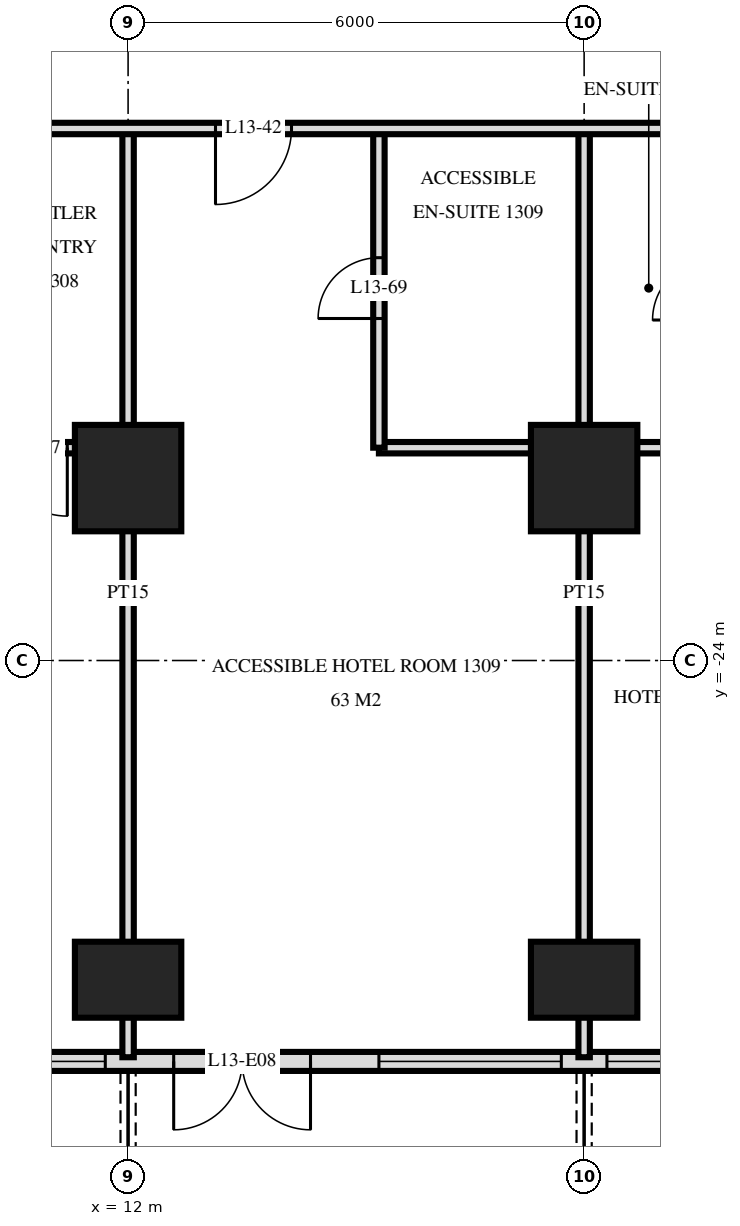
"""IFC4 building model, lengths in metres.
Left out: names, types, materials, properties, quantities, classifications, styles, units other than length and angle.
Written with IfcOpenShell. Run it as: python <this file> out.ifc"""

import sys

from ifc_helpers import new_model, si_unit, direction, frame, frame_2d, origin, origin_2d, place, context, subcontext, project, spatial, rectangle, extrude, element, fill, save


model = new_model("IFC4")
c1 = context("Model", 3, precision=1e-05, world=origin(), true_north=direction((0.0, 1.0)))
c2 = subcontext(c1, "Body", "Model", "MODEL_VIEW")
j1 = project(units=[si_unit("LENGTHUNIT", "METRE"), si_unit("PLANEANGLEUNIT", "RADIAN")], contexts=[c1])
p1 = place(None, origin())
s1 = spatial("IfcSite", under=j1, at=p1, CompositionType="ELEMENT")
p2 = place(p1, origin())
s2 = spatial("IfcBuilding", under=s1, at=p2, CompositionType="ELEMENT")
p3 = place(p2, frame((0.0, 0.0, 56.4)))
s3 = spatial("IfcBuildingStorey", under=s2, at=p3, CompositionType="ELEMENT", Elevation=56.4)
p4 = place(p3, frame((12.0, -28.2, 0.0), z_axis=(0.0, 0.0, 1.0), x_axis=(1.0, 0.0, 0.0)))
e1 = element("IfcColumn", 1, at=p4, inside=s3, PredefinedType="COLUMN", context=c2, shape_type="SweptSolid", body=[
    extrude(rectangle(XDim=1.4, YDim=1.0, at=origin_2d()), origin(), (0.0, 0.0, 1.0), 3.6),
])
p5 = place(p3, frame((12.0, -21.6, 0.0), z_axis=(0.0, 0.0, 1.0), x_axis=(1.0, 0.0, 0.0)))
e2 = element("IfcColumn", 2, at=p5, inside=s3, PredefinedType="COLUMN", context=c2, shape_type="SweptSolid", body=[
    extrude(rectangle(XDim=1.4, YDim=1.4, at=origin_2d()), origin(), (0.0, 0.0, 1.0), 3.6),
])
p6 = place(p3, frame((18.0, -28.2, 0.0), z_axis=(0.0, 0.0, 1.0), x_axis=(1.0, 0.0, 0.0)))
e3 = element("IfcColumn", 3, at=p6, inside=s3, PredefinedType="COLUMN", context=c2, shape_type="SweptSolid", body=[
    extrude(rectangle(XDim=1.4, YDim=1.0, at=origin_2d()), origin(), (0.0, 0.0, 1.0), 3.6),
])
p7 = place(p3, frame((18.0, -21.6, 0.0), z_axis=(0.0, 0.0, 1.0), x_axis=(1.0, 0.0, 0.0)))
e4 = element("IfcColumn", 4, at=p7, inside=s3, PredefinedType="COLUMN", context=c2, shape_type="SweptSolid", body=[
    extrude(rectangle(XDim=1.4, YDim=1.4, at=origin_2d()), origin(), (0.0, 0.0, 1.0), 3.6),
])
p8 = place(p3, frame((-28.775, -29.275, 0.0), z_axis=(0.0, 0.0, 1.0), x_axis=(1.0, 0.0, 0.0)))
e5 = element("IfcWall", 5, at=p8, inside=s3, PredefinedType="SOLIDWALL", context=c2, shape_type="SweptSolid", body=[
    extrude(rectangle(XDim=57.551, YDim=0.25, at=frame_2d((28.775, 0.0))), origin(), (0.0, 0.0, 1.0), 3.32),
])
p9 = place(p8, frame((0.575, 0.0, 0.0)))
e6 = element("IfcOpeningElement", 6, at=p9, cuts=e5, PredefinedType="OPENING", context=c2, shape_type="SweptSolid", body=[
    extrude(rectangle(XDim=1.8, YDim=2.4, at=frame_2d((0.9, 1.2))), frame((0.0, 0.135, 0.0), z_axis=(0.0, -1.0, 0.0), x_axis=(1.0, 0.0, 0.0)), (0.0, 0.0, 1.0), 0.27),
])
p10 = place(p8, frame((5.375, 0.0, 0.0)))
e7 = element("IfcOpeningElement", 7, at=p10, cuts=e5, PredefinedType="OPENING", context=c2, shape_type="SweptSolid", body=[
    extrude(rectangle(XDim=1.8, YDim=2.4, at=frame_2d((0.9, 1.2))), frame((0.0, 0.135, 0.0), z_axis=(0.0, -1.0, 0.0), x_axis=(1.0, 0.0, 0.0)), (0.0, 0.0, 1.0), 0.27),
])
p11 = place(p8, frame((8.075, 0.0, 0.3)))
e8 = element("IfcOpeningElement", 8, at=p11, cuts=e5, PredefinedType="OPENING", context=c2, shape_type="SweptSolid", body=[
    extrude(rectangle(XDim=2.4, YDim=2.1, at=frame_2d((1.2, 1.05))), frame((0.0, 0.135, 0.0), z_axis=(0.0, -1.0, 0.0), x_axis=(1.0, 0.0, 0.0)), (0.0, 0.0, 1.0), 0.27),
])
p12 = place(p8, frame((11.375, 0.0, 0.0)))
e9 = element("IfcOpeningElement", 9, at=p12, cuts=e5, PredefinedType="OPENING", context=c2, shape_type="SweptSolid", body=[
    extrude(rectangle(XDim=1.8, YDim=2.4, at=frame_2d((0.9, 1.2))), frame((0.0, 0.135, 0.0), z_axis=(0.0, -1.0, 0.0), x_axis=(1.0, 0.0, 0.0)), (0.0, 0.0, 1.0), 0.27),
])
p13 = place(p8, frame((14.075, 0.0, 0.3)))
e10 = element("IfcOpeningElement", 10, at=p13, cuts=e5, PredefinedType="OPENING", context=c2, shape_type="SweptSolid", body=[
    extrude(rectangle(XDim=2.4, YDim=2.1, at=frame_2d((1.2, 1.05))), frame((0.0, 0.135, 0.0), z_axis=(0.0, -1.0, 0.0), x_axis=(1.0, 0.0, 0.0)), (0.0, 0.0, 1.0), 0.27),
])
p14 = place(p8, frame((17.375, 0.0, 0.0)))
e11 = element("IfcOpeningElement", 11, at=p14, cuts=e5, PredefinedType="OPENING", context=c2, shape_type="SweptSolid", body=[
    extrude(rectangle(XDim=1.8, YDim=2.4, at=frame_2d((0.9, 1.2))), frame((0.0, 0.135, 0.0), z_axis=(0.0, -1.0, 0.0), x_axis=(1.0, 0.0, 0.0)), (0.0, 0.0, 1.0), 0.27),
])
p15 = place(p8, frame((20.075, 0.0, 0.3)))
e12 = element("IfcOpeningElement", 12, at=p15, cuts=e5, PredefinedType="OPENING", context=c2, shape_type="SweptSolid", body=[
    extrude(rectangle(XDim=2.4, YDim=2.1, at=frame_2d((1.2, 1.05))), frame((0.0, 0.135, 0.0), z_axis=(0.0, -1.0, 0.0), x_axis=(1.0, 0.0, 0.0)), (0.0, 0.0, 1.0), 0.27),
])
p16 = place(p8, frame((23.075, 0.0, 0.3)))
e13 = element("IfcOpeningElement", 13, at=p16, cuts=e5, PredefinedType="OPENING", context=c2, shape_type="SweptSolid", body=[
    extrude(rectangle(XDim=2.4, YDim=2.1, at=frame_2d((1.2, 1.05))), frame((0.0, 0.135, 0.0), z_axis=(0.0, -1.0, 0.0), x_axis=(1.0, 0.0, 0.0)), (0.0, 0.0, 1.0), 0.27),
])
p17 = place(p8, frame((26.375, 0.0, 0.0)))
e14 = element("IfcOpeningElement", 14, at=p17, cuts=e5, PredefinedType="OPENING", context=c2, shape_type="SweptSolid", body=[
    extrude(rectangle(XDim=1.8, YDim=2.4, at=frame_2d((0.9, 1.2))), frame((0.0, 0.135, 0.0), z_axis=(0.0, -1.0, 0.0), x_axis=(1.0, 0.0, 0.0)), (0.0, 0.0, 1.0), 0.27),
])
p18 = place(p8, frame((29.075, 0.0, 0.3)))
e15 = element("IfcOpeningElement", 15, at=p18, cuts=e5, PredefinedType="OPENING", context=c2, shape_type="SweptSolid", body=[
    extrude(rectangle(XDim=2.4, YDim=2.1, at=frame_2d((1.2, 1.05))), frame((0.0, 0.135, 0.0), z_axis=(0.0, -1.0, 0.0), x_axis=(1.0, 0.0, 0.0)), (0.0, 0.0, 1.0), 0.27),
])
p19 = place(p8, frame((32.375, 0.0, 0.0)))
e16 = element("IfcOpeningElement", 16, at=p19, cuts=e5, PredefinedType="OPENING", context=c2, shape_type="SweptSolid", body=[
    extrude(rectangle(XDim=1.8, YDim=2.4, at=frame_2d((0.9, 1.2))), frame((0.0, 0.135, 0.0), z_axis=(0.0, -1.0, 0.0), x_axis=(1.0, 0.0, 0.0)), (0.0, 0.0, 1.0), 0.27),
])
p20 = place(p8, frame((35.375, 0.0, 0.0)))
e17 = element("IfcOpeningElement", 17, at=p20, cuts=e5, PredefinedType="OPENING", context=c2, shape_type="SweptSolid", body=[
    extrude(rectangle(XDim=1.8, YDim=2.4, at=frame_2d((0.9, 1.2))), frame((0.0, 0.135, 0.0), z_axis=(0.0, -1.0, 0.0), x_axis=(1.0, 0.0, 0.0)), (0.0, 0.0, 1.0), 0.27),
])
p21 = place(p8, frame((38.075, 0.0, 0.3)))
e18 = element("IfcOpeningElement", 18, at=p21, cuts=e5, PredefinedType="OPENING", context=c2, shape_type="SweptSolid", body=[
    extrude(rectangle(XDim=2.4, YDim=2.1, at=frame_2d((1.2, 1.05))), frame((0.0, 0.135, 0.0), z_axis=(0.0, -1.0, 0.0), x_axis=(1.0, 0.0, 0.0)), (0.0, 0.0, 1.0), 0.27),
])
p22 = place(p8, frame((41.375, 0.0, 0.0)))
e19 = element("IfcOpeningElement", 19, at=p22, cuts=e5, PredefinedType="OPENING", context=c2, shape_type="SweptSolid", body=[
    extrude(rectangle(XDim=1.8, YDim=2.4, at=frame_2d((0.9, 1.2))), frame((0.0, 0.135, 0.0), z_axis=(0.0, -1.0, 0.0), x_axis=(1.0, 0.0, 0.0)), (0.0, 0.0, 1.0), 0.27),
])
p23 = place(p8, frame((44.075, 0.0, 0.3)))
e20 = element("IfcOpeningElement", 20, at=p23, cuts=e5, PredefinedType="OPENING", context=c2, shape_type="SweptSolid", body=[
    extrude(rectangle(XDim=2.4, YDim=2.1, at=frame_2d((1.2, 1.05))), frame((0.0, 0.135, 0.0), z_axis=(0.0, -1.0, 0.0), x_axis=(1.0, 0.0, 0.0)), (0.0, 0.0, 1.0), 0.27),
])
p24 = place(p8, frame((47.075, 0.0, 0.3)))
e21 = element("IfcOpeningElement", 21, at=p24, cuts=e5, PredefinedType="OPENING", context=c2, shape_type="SweptSolid", body=[
    extrude(rectangle(XDim=2.4, YDim=2.1, at=frame_2d((1.2, 1.05))), frame((0.0, 0.135, 0.0), z_axis=(0.0, -1.0, 0.0), x_axis=(1.0, 0.0, 0.0)), (0.0, 0.0, 1.0), 0.27),
])
p25 = place(p8, frame((50.375, 0.0, 0.0)))
e22 = element("IfcOpeningElement", 22, at=p25, cuts=e5, PredefinedType="OPENING", context=c2, shape_type="SweptSolid", body=[
    extrude(rectangle(XDim=1.8, YDim=2.4, at=frame_2d((0.9, 1.2))), frame((0.0, 0.135, 0.0), z_axis=(0.0, -1.0, 0.0), x_axis=(1.0, 0.0, 0.0)), (0.0, 0.0, 1.0), 0.27),
])
p26 = place(p8, frame((53.375, 0.0, 0.0)))
e23 = element("IfcOpeningElement", 23, at=p26, cuts=e5, PredefinedType="OPENING", context=c2, shape_type="SweptSolid", body=[
    extrude(rectangle(XDim=1.8, YDim=2.4, at=frame_2d((0.9, 1.2))), frame((0.0, 0.135, 0.0), z_axis=(0.0, -1.0, 0.0), x_axis=(1.0, 0.0, 0.0)), (0.0, 0.0, 1.0), 0.27),
])
p27 = place(p3, frame((18.0, -29.22, 0.0), z_axis=(0.0, 0.0, 1.0), x_axis=(0.0, 1.0, 0.0)))
e24 = element("IfcWall", 24, at=p27, inside=s3, PredefinedType="PARTITIONING", context=c2, shape_type="SweptSolid", body=[
    extrude(rectangle(XDim=12.22, YDim=0.15, at=frame_2d((6.11, 0.0))), origin(), (0.0, 0.0, 1.0), 3.32),
])
p28 = place(p3, frame((15.3, -21.2, 0.0), z_axis=(0.0, 0.0, 1.0), x_axis=(0.0, 1.0, 0.0)))
e25 = element("IfcWall", 25, at=p28, inside=s3, PredefinedType="PARTITIONING", context=c2, shape_type="SweptSolid", body=[
    extrude(rectangle(XDim=4.2, YDim=0.15, at=frame_2d((2.1, 0.0))), origin(), (0.0, 0.0, 1.0), 3.32),
])
p29 = place(p28, frame((1.7, 0.0, 0.0)))
e26 = element("IfcOpeningElement", 26, at=p29, cuts=e25, PredefinedType="OPENING", context=c2, shape_type="SweptSolid", body=[
    extrude(rectangle(XDim=0.8, YDim=2.1, at=frame_2d((0.4, 1.05))), frame((0.0, 0.085, 0.0), z_axis=(0.0, -1.0, 0.0), x_axis=(1.0, 0.0, 0.0)), (0.0, 0.0, 1.0), 0.17),
])
p30 = place(p3, frame((12.0, -29.22, 0.0), z_axis=(0.0, 0.0, 1.0), x_axis=(0.0, 1.0, 0.0)))
e27 = element("IfcWall", 27, at=p30, inside=s3, PredefinedType="PARTITIONING", context=c2, shape_type="SweptSolid", body=[
    extrude(rectangle(XDim=12.22, YDim=0.15, at=frame_2d((6.11, 0.0))), origin(), (0.0, 0.0, 1.0), 3.32),
])
p31 = place(p3, frame((4.2, -21.2, 0.0), z_axis=(0.0, 0.0, 1.0), x_axis=(1.0, 0.0, 0.0)))
e28 = element("IfcWall", 28, at=p31, inside=s3, PredefinedType="PARTITIONING", context=c2, shape_type="SweptSolid", body=[
    extrude(rectangle(XDim=7.8, YDim=0.15, at=frame_2d((3.9, 0.0))), origin(), (0.0, 0.0, 1.0), 3.32),
])
p32 = place(p31, frame((0.2, 0.0, 0.0)))
e29 = element("IfcOpeningElement", 29, at=p32, cuts=e28, PredefinedType="OPENING", context=c2, shape_type="SweptSolid", body=[
    extrude(rectangle(XDim=0.8, YDim=2.1, at=frame_2d((0.4, 1.05))), frame((0.0, 0.085, 0.0), z_axis=(0.0, -1.0, 0.0), x_axis=(1.0, 0.0, 0.0)), (0.0, 0.0, 1.0), 0.17),
])
p33 = place(p31, frame((4.03, 0.0, 0.0)))
e30 = element("IfcOpeningElement", 30, at=p33, cuts=e28, PredefinedType="OPENING", context=c2, shape_type="SweptSolid", body=[
    extrude(rectangle(XDim=0.9, YDim=2.1, at=frame_2d((0.45, 1.05))), frame((0.0, 0.085, 0.0), z_axis=(0.0, -1.0, 0.0), x_axis=(1.0, 0.0, 0.0)), (0.0, 0.0, 1.0), 0.17),
])
p34 = place(p31, frame((6.1, 0.0, 0.0)))
e31 = element("IfcOpeningElement", 31, at=p34, cuts=e28, PredefinedType="OPENING", context=c2, shape_type="SweptSolid", body=[
    extrude(rectangle(XDim=0.9, YDim=2.1, at=frame_2d((0.45, 1.05))), frame((0.0, 0.085, 0.0), z_axis=(0.0, -1.0, 0.0), x_axis=(1.0, 0.0, 0.0)), (0.0, 0.0, 1.0), 0.17),
])
p35 = place(p3, frame((15.3, -21.2, 0.0), z_axis=(0.0, 0.0, 1.0), x_axis=(1.0, 0.0, 0.0)))
e32 = element("IfcWall", 32, at=p35, inside=s3, PredefinedType="PARTITIONING", context=c2, shape_type="SweptSolid", body=[
    extrude(rectangle(XDim=4.4, YDim=0.15, at=frame_2d((2.2, 0.0))), origin(), (0.0, 0.0, 1.0), 3.32),
])
p36 = place(p3, frame((-33.12, -17.0, 0.0), z_axis=(0.0, 0.0, 1.0), x_axis=(1.0, 0.0, 0.0)))
e33 = element("IfcWall", 33, at=p36, inside=s3, PredefinedType="PARTITIONING", context=c2, shape_type="SweptSolid", body=[
    extrude(rectangle(XDim=66.24, YDim=0.15, at=frame_2d((33.12, 0.0))), origin(), (0.0, 0.0, 1.0), 3.32),
])
p37 = place(p36, frame((12.27, 0.0, 0.0)))
e34 = element("IfcOpeningElement", 34, at=p37, cuts=e33, PredefinedType="OPENING", context=c2, shape_type="SweptSolid", body=[
    extrude(rectangle(XDim=1.0, YDim=2.1, at=frame_2d((0.5, 1.05))), frame((0.0, 0.085, 0.0), z_axis=(0.0, -1.0, 0.0), x_axis=(1.0, 0.0, 0.0)), (0.0, 0.0, 1.0), 0.17),
])
p38 = place(p36, frame((16.97, 0.0, 0.0)))
e35 = element("IfcOpeningElement", 35, at=p38, cuts=e33, PredefinedType="OPENING", context=c2, shape_type="SweptSolid", body=[
    extrude(rectangle(XDim=1.0, YDim=2.1, at=frame_2d((0.5, 1.05))), frame((0.0, 0.085, 0.0), z_axis=(0.0, -1.0, 0.0), x_axis=(1.0, 0.0, 0.0)), (0.0, 0.0, 1.0), 0.17),
])
p39 = place(p36, frame((18.27, 0.0, 0.0)))
e36 = element("IfcOpeningElement", 36, at=p39, cuts=e33, PredefinedType="OPENING", context=c2, shape_type="SweptSolid", body=[
    extrude(rectangle(XDim=1.0, YDim=2.1, at=frame_2d((0.5, 1.05))), frame((0.0, 0.085, 0.0), z_axis=(0.0, -1.0, 0.0), x_axis=(1.0, 0.0, 0.0)), (0.0, 0.0, 1.0), 0.17),
])
p40 = place(p36, frame((22.97, 0.0, 0.0)))
e37 = element("IfcOpeningElement", 37, at=p40, cuts=e33, PredefinedType="OPENING", context=c2, shape_type="SweptSolid", body=[
    extrude(rectangle(XDim=1.0, YDim=2.1, at=frame_2d((0.5, 1.05))), frame((0.0, 0.085, 0.0), z_axis=(0.0, -1.0, 0.0), x_axis=(1.0, 0.0, 0.0)), (0.0, 0.0, 1.0), 0.17),
])
p41 = place(p36, frame((24.27, 0.0, 0.0)))
e38 = element("IfcOpeningElement", 38, at=p41, cuts=e33, PredefinedType="OPENING", context=c2, shape_type="SweptSolid", body=[
    extrude(rectangle(XDim=1.0, YDim=2.1, at=frame_2d((0.5, 1.05))), frame((0.0, 0.085, 0.0), z_axis=(0.0, -1.0, 0.0), x_axis=(1.0, 0.0, 0.0)), (0.0, 0.0, 1.0), 0.17),
])
p42 = place(p36, frame((28.97, 0.0, 0.0)))
e39 = element("IfcOpeningElement", 39, at=p42, cuts=e33, PredefinedType="OPENING", context=c2, shape_type="SweptSolid", body=[
    extrude(rectangle(XDim=1.0, YDim=2.1, at=frame_2d((0.5, 1.05))), frame((0.0, 0.085, 0.0), z_axis=(0.0, -1.0, 0.0), x_axis=(1.0, 0.0, 0.0)), (0.0, 0.0, 1.0), 0.17),
])
p43 = place(p36, frame((30.27, 0.0, 0.0)))
e40 = element("IfcOpeningElement", 40, at=p43, cuts=e33, PredefinedType="OPENING", context=c2, shape_type="SweptSolid", body=[
    extrude(rectangle(XDim=1.0, YDim=2.1, at=frame_2d((0.5, 1.05))), frame((0.0, 0.085, 0.0), z_axis=(0.0, -1.0, 0.0), x_axis=(1.0, 0.0, 0.0)), (0.0, 0.0, 1.0), 0.17),
])
p44 = place(p36, frame((33.82, 0.0, 0.0)))
e41 = element("IfcOpeningElement", 41, at=p44, cuts=e33, PredefinedType="OPENING", context=c2, shape_type="SweptSolid", body=[
    extrude(rectangle(XDim=1.0, YDim=2.1, at=frame_2d((0.5, 1.05))), frame((0.0, 0.085, 0.0), z_axis=(0.0, -1.0, 0.0), x_axis=(1.0, 0.0, 0.0)), (0.0, 0.0, 1.0), 0.17),
])
p45 = place(p36, frame((46.27, 0.0, 0.0)))
e42 = element("IfcOpeningElement", 42, at=p45, cuts=e33, PredefinedType="OPENING", context=c2, shape_type="SweptSolid", body=[
    extrude(rectangle(XDim=1.0, YDim=2.1, at=frame_2d((0.5, 1.05))), frame((0.0, 0.085, 0.0), z_axis=(0.0, -1.0, 0.0), x_axis=(1.0, 0.0, 0.0)), (0.0, 0.0, 1.0), 0.17),
])
p46 = place(p36, frame((52.97, 0.0, 0.0)))
e43 = element("IfcOpeningElement", 43, at=p46, cuts=e33, PredefinedType="OPENING", context=c2, shape_type="SweptSolid", body=[
    extrude(rectangle(XDim=1.0, YDim=2.1, at=frame_2d((0.5, 1.05))), frame((0.0, 0.085, 0.0), z_axis=(0.0, -1.0, 0.0), x_axis=(1.0, 0.0, 0.0)), (0.0, 0.0, 1.0), 0.17),
])
p47 = place(p36, frame((6.05, 0.0, 0.0)))
e44 = element("IfcOpeningElement", 44, at=p47, cuts=e33, PredefinedType="OPENING", context=c2, shape_type="SweptSolid", body=[
    extrude(rectangle(XDim=1.0, YDim=2.1, at=frame_2d((0.5, 1.05))), frame((0.0, 0.085, 0.0), z_axis=(0.0, -1.0, 0.0), x_axis=(1.0, 0.0, 0.0)), (0.0, 0.0, 1.0), 0.17),
])
p48 = place(p36, frame((59.15, 0.0, 0.0)))
e45 = element("IfcOpeningElement", 45, at=p48, cuts=e33, PredefinedType="OPENING", context=c2, shape_type="SweptSolid", body=[
    extrude(rectangle(XDim=1.0, YDim=2.1, at=frame_2d((0.5, 1.05))), frame((0.0, 0.085, 0.0), z_axis=(0.0, -1.0, 0.0), x_axis=(1.0, 0.0, 0.0)), (0.0, 0.0, 1.0), 0.17),
])
p49 = place(p21, origin())
e46 = element("IfcWindow", 46, at=p49, inside=s3, PartitioningType="SINGLE_PANEL", PredefinedType="WINDOW", context=c2, shape_type="SweptSolid", body=[
    extrude(rectangle(XDim=2.4, YDim=2.1, at=frame_2d((1.2, 1.05))), frame((0.0, 0.03, 0.0), z_axis=(0.0, -1.0, 0.0), x_axis=(1.0, 0.0, 0.0)), (0.0, 0.0, 1.0), 0.06),
])
fill(e18, e46)
p50 = place(p22, frame((0.9, 0.0, 0.0), z_axis=(0.0, 0.0, 1.0), x_axis=(-1.0, 0.0, 0.0)))
e47 = element("IfcDoor", 47, at=p50, inside=s3, OperationType="DOUBLE_DOOR_SINGLE_SWING", PredefinedType="DOOR", context=c2, shape_type="SweptSolid", body=[
    extrude(rectangle(XDim=1.8, YDim=2.4, at=frame_2d((0.0, 1.2))), frame((0.0, -0.025, 0.0), z_axis=(0.0, 1.0, 0.0), x_axis=(-1.0, 0.0, 0.0)), (0.0, 0.0, 1.0), 0.05),
])
fill(e19, e47)
p51 = place(p23, origin())
e48 = element("IfcWindow", 48, at=p51, inside=s3, PartitioningType="SINGLE_PANEL", PredefinedType="WINDOW", context=c2, shape_type="SweptSolid", body=[
    extrude(rectangle(XDim=2.4, YDim=2.1, at=frame_2d((1.2, 1.05))), frame((0.0, 0.03, 0.0), z_axis=(0.0, -1.0, 0.0), x_axis=(1.0, 0.0, 0.0)), (0.0, 0.0, 1.0), 0.06),
])
fill(e20, e48)
p52 = place(p24, origin())
e49 = element("IfcWindow", 49, at=p52, inside=s3, PartitioningType="SINGLE_PANEL", PredefinedType="WINDOW", context=c2, shape_type="SweptSolid", body=[
    extrude(rectangle(XDim=2.4, YDim=2.1, at=frame_2d((1.2, 1.05))), frame((0.0, 0.03, 0.0), z_axis=(0.0, -1.0, 0.0), x_axis=(1.0, 0.0, 0.0)), (0.0, 0.0, 1.0), 0.06),
])
fill(e21, e49)
p53 = place(p45, frame((0.5, 0.0, 0.0), z_axis=(0.0, 0.0, 1.0), x_axis=(-1.0, 0.0, 0.0)))
e50 = element("IfcDoor", 50, at=p53, inside=s3, OperationType="SINGLE_SWING_LEFT", PredefinedType="DOOR", context=c2, shape_type="SweptSolid", body=[
    extrude(rectangle(XDim=1.0, YDim=2.1, at=frame_2d((0.0, 1.05))), frame((0.0, -0.025, 0.0), z_axis=(0.0, 1.0, 0.0), x_axis=(-1.0, 0.0, 0.0)), (0.0, 0.0, 1.0), 0.05),
])
fill(e42, e50)
p54 = place(p34, frame((0.45, 0.0, 0.0), z_axis=(0.0, 0.0, 1.0), x_axis=(-1.0, 0.0, 0.0)))
e51 = element("IfcDoor", 51, at=p54, inside=s3, OperationType="SINGLE_SWING_RIGHT", PredefinedType="DOOR", context=c2, shape_type="SweptSolid", body=[
    extrude(rectangle(XDim=0.9, YDim=2.1, at=frame_2d((0.0, 1.05))), frame((0.0, -0.025, 0.0), z_axis=(0.0, 1.0, 0.0), x_axis=(-1.0, 0.0, 0.0)), (0.0, 0.0, 1.0), 0.05),
])
fill(e31, e51)
p55 = place(p29, origin())
e52 = element("IfcDoor", 52, at=p55, inside=s3, OperationType="SINGLE_SWING_RIGHT", PredefinedType="DOOR", context=c2, shape_type="SweptSolid", body=[
    extrude(rectangle(XDim=0.8, YDim=2.1, at=frame_2d((0.4, 1.05))), frame((0.0, 0.025, 0.0), z_axis=(0.0, -1.0, 0.0), x_axis=(1.0, 0.0, 0.0)), (0.0, 0.0, 1.0), 0.05),
])
fill(e26, e52)
save(model, sys.argv[1])
